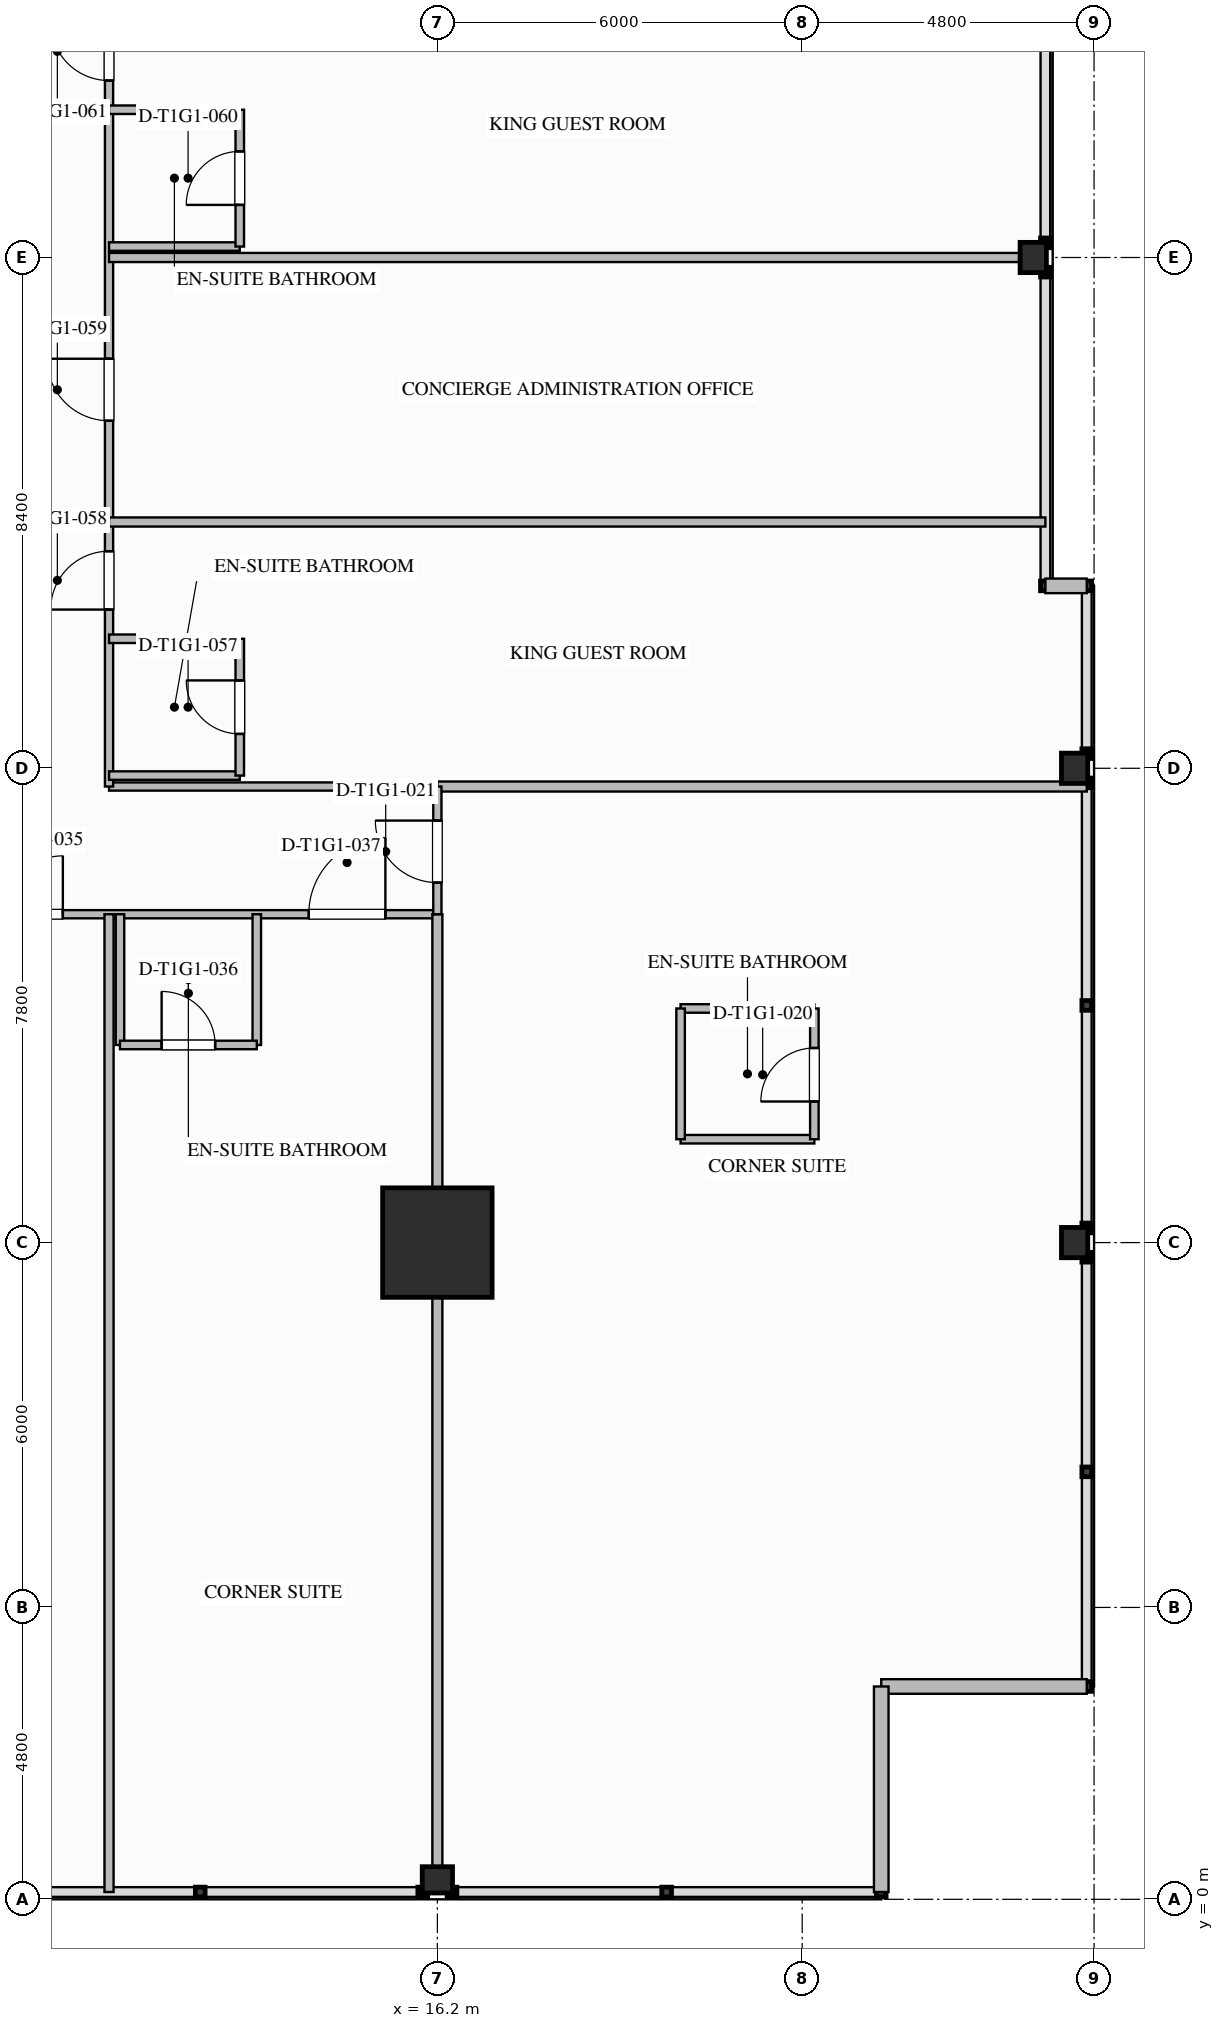
"""IFC4 building model, lengths in metres.
Left out: names, types, materials, properties, quantities, classifications, styles, units other than length and angle.
Written with IfcOpenShell. Run it as: python <this file> out.ifc"""

import sys

from ifc_helpers import new_model, si_unit, direction, frame, frame_2d, origin, origin_2d, place, context, subcontext, project, spatial, rectangle, i_section, extrude, element, fill, save


model = new_model("IFC4")
c1 = context("Model", 3, precision=1e-05, world=origin(), true_north=direction((0.0, 1.0)))
c2 = subcontext(c1, "Body", "Model", "MODEL_VIEW")
j1 = project(units=[si_unit("LENGTHUNIT", "METRE"), si_unit("PLANEANGLEUNIT", "RADIAN")], contexts=[c1])
p1 = place(None, origin())
s1 = spatial("IfcSite", under=j1, at=p1, CompositionType="ELEMENT")
p2 = place(p1, origin())
s2 = spatial("IfcBuilding", under=s1, at=p2, CompositionType="ELEMENT")
p3 = place(p2, frame((0.0, 0.0, 36.7)))
s3 = spatial("IfcBuildingStorey", under=s2, at=p3, CompositionType="ELEMENT", Elevation=36.7)
p4 = place(p3, frame((16.2, 10.8, 0.0), z_axis=(0.0, 0.0, 1.0), x_axis=(1.0, 0.0, 0.0)))
e1 = element("IfcColumn", 1, at=p4, inside=s3, PredefinedType="COLUMN", context=c2, shape_type="SweptSolid", body=[
    extrude(rectangle(XDim=1.8, YDim=1.8, at=origin_2d()), origin(), (0.0, 0.0, 1.0), 3.5),
])
for number, where, z_axis, x_axis in (
    (2, (26.68, 10.8, 0.0), (0.0, 0.0, 1.0), (1.0, 0.0, 0.0)),
    (3, (26.68, 18.6, 0.0), (0.0, 0.0, 1.0), (1.0, 0.0, 0.0)),
    (4, (26.0, 27.0, 0.0), (0.0, 0.0, 1.0), (1.0, 0.0, 0.0)),
    (5, (16.2, 0.32, 0.0), (0.0, 0.0, 1.0), (0.0, 1.0, 0.0)),
):
    element("IfcColumn", number, at=place(p3, frame(where, z_axis=z_axis, x_axis=x_axis)), inside=s3, PredefinedType="COLUMN", context=c2, shape_type="SweptSolid", body=[
        extrude(i_section(OverallWidth=0.432, OverallDepth=0.498, WebThickness=0.056, FlangeThickness=0.089, FilletRadius=0.03, at=origin_2d()), origin(), (0.0, 0.0, 1.0), 3.497),
    ])
for number, where, z_axis, x_axis in (
    (6, (26.88, 3.5, 0.0), (0.0, 0.0, 1.0), (-1.0, 0.0, 0.0)),
    (7, (23.5, 3.5, 0.0), (0.0, 0.0, 1.0), (0.0, -1.0, 0.0)),
):
    element("IfcWall", number, at=place(p3, frame(where, z_axis=z_axis, x_axis=x_axis)), inside=s3, PredefinedType="STANDARD", context=c2, shape_type="SweptSolid", body=[
        extrude(rectangle(XDim=3.38, YDim=0.24, at=frame_2d((1.69, 0.0))), origin(), (0.0, 0.0, 1.0), 3.24),
    ])
p5 = place(p3, frame((26.2, 21.6, 0.0), z_axis=(0.0, 0.0, 1.0), x_axis=(1.0, 0.0, 0.0)))
e8 = element("IfcWall", 8, at=p5, inside=s3, PredefinedType="STANDARD", context=c2, shape_type="SweptSolid", body=[
    extrude(rectangle(XDim=0.68, YDim=0.24, at=frame_2d((0.34, 0.0))), origin(), (0.0, 0.0, 1.0), 3.24),
])
p6 = place(p3, frame((-16.2, 16.2, 0.0), z_axis=(0.0, 0.0, 1.0), x_axis=(1.0, 0.0, 0.0)))
e9 = element("IfcWall", 9, at=p6, inside=s3, PredefinedType="PARTITIONING", context=c2, shape_type="SweptSolid", body=[
    extrude(rectangle(XDim=32.4, YDim=0.135, at=frame_2d((16.2, 0.0))), origin(), (0.0, 0.0, 1.0), 3.24),
])
p7 = place(p6, frame((3.285, 0.0, 0.0)))
e10 = element("IfcOpeningElement", 10, at=p7, cuts=e9, PredefinedType="OPENING", context=c2, shape_type="SweptSolid", body=[
    extrude(rectangle(XDim=1.26, YDim=2.2, at=frame_2d((0.63, 1.1))), frame((0.0, 0.077, 0.0), z_axis=(0.0, -1.0, 0.0), x_axis=(1.0, 0.0, 0.0)), (0.0, 0.0, 1.0), 0.155),
])
p8 = place(p6, frame((8.59, 0.0, 0.0)))
e11 = element("IfcOpeningElement", 11, at=p8, cuts=e9, PredefinedType="OPENING", context=c2, shape_type="SweptSolid", body=[
    extrude(rectangle(XDim=0.96, YDim=2.15, at=frame_2d((0.48, 1.075))), frame((0.0, 0.077, 0.0), z_axis=(0.0, -1.0, 0.0), x_axis=(1.0, 0.0, 0.0)), (0.0, 0.0, 1.0), 0.155),
])
p9 = place(p6, frame((13.84, 0.0, 0.0)))
e12 = element("IfcOpeningElement", 12, at=p9, cuts=e9, PredefinedType="OPENING", context=c2, shape_type="SweptSolid", body=[
    extrude(rectangle(XDim=1.26, YDim=2.2, at=frame_2d((0.63, 1.1))), frame((0.0, 0.077, 0.0), z_axis=(0.0, -1.0, 0.0), x_axis=(1.0, 0.0, 0.0)), (0.0, 0.0, 1.0), 0.155),
])
p10 = place(p6, frame((19.73, 0.0, 0.0)))
e13 = element("IfcOpeningElement", 13, at=p10, cuts=e9, PredefinedType="OPENING", context=c2, shape_type="SweptSolid", body=[
    extrude(rectangle(XDim=1.26, YDim=2.2, at=frame_2d((0.63, 1.1))), frame((0.0, 0.077, 0.0), z_axis=(0.0, -1.0, 0.0), x_axis=(1.0, 0.0, 0.0)), (0.0, 0.0, 1.0), 0.155),
])
p11 = place(p6, frame((25.281, 0.0, 0.0)))
e14 = element("IfcOpeningElement", 14, at=p11, cuts=e9, PredefinedType="OPENING", context=c2, shape_type="SweptSolid", body=[
    extrude(rectangle(XDim=0.96, YDim=2.15, at=frame_2d((0.48, 1.075))), frame((0.0, 0.077, 0.0), z_axis=(0.0, -1.0, 0.0), x_axis=(1.0, 0.0, 0.0)), (0.0, 0.0, 1.0), 0.155),
])
p12 = place(p6, frame((30.285, 0.0, 0.0)))
e15 = element("IfcOpeningElement", 15, at=p12, cuts=e9, PredefinedType="OPENING", context=c2, shape_type="SweptSolid", body=[
    extrude(rectangle(XDim=1.26, YDim=2.2, at=frame_2d((0.63, 1.1))), frame((0.0, 0.077, 0.0), z_axis=(0.0, -1.0, 0.0), x_axis=(1.0, 0.0, 0.0)), (0.0, 0.0, 1.0), 0.155),
])
p13 = place(p3, frame((10.8, 18.3, 0.0), z_axis=(0.0, 0.0, 1.0), x_axis=(1.0, 0.0, 0.0)))
e16 = element("IfcWall", 16, at=p13, inside=s3, PredefinedType="PARTITIONING", context=c2, shape_type="SweptSolid", body=[
    extrude(rectangle(XDim=5.4, YDim=0.135, at=frame_2d((2.7, 0.0))), origin(), (0.0, 0.0, 1.0), 3.24),
])
p14 = place(p3, frame((10.8, 18.3, 0.0), z_axis=(0.0, 0.0, 1.0), x_axis=(0.0, 1.0, 0.0)))
e17 = element("IfcWall", 17, at=p14, inside=s3, PredefinedType="PARTITIONING", context=c2, shape_type="SweptSolid", body=[
    extrude(rectangle(XDim=17.4, YDim=0.135, at=frame_2d((8.7, 0.0))), origin(), (0.0, 0.0, 1.0), 3.24),
])
p15 = place(p14, frame((2.91, 0.0, 0.0)))
e18 = element("IfcOpeningElement", 18, at=p15, cuts=e17, PredefinedType="OPENING", context=c2, shape_type="SweptSolid", body=[
    extrude(rectangle(XDim=0.96, YDim=2.15, at=frame_2d((0.48, 1.075))), frame((0.0, 0.077, 0.0), z_axis=(0.0, -1.0, 0.0), x_axis=(1.0, 0.0, 0.0)), (0.0, 0.0, 1.0), 0.155),
])
p16 = place(p14, frame((6.015, 0.0, 0.0)))
e19 = element("IfcOpeningElement", 19, at=p16, cuts=e17, PredefinedType="OPENING", context=c2, shape_type="SweptSolid", body=[
    extrude(rectangle(XDim=1.02, YDim=2.15, at=frame_2d((0.51, 1.075))), frame((0.0, 0.077, 0.0), z_axis=(0.0, -1.0, 0.0), x_axis=(1.0, 0.0, 0.0)), (0.0, 0.0, 1.0), 0.155),
])
p17 = place(p14, frame((11.61, 0.0, 0.0)))
e20 = element("IfcOpeningElement", 20, at=p17, cuts=e17, PredefinedType="OPENING", context=c2, shape_type="SweptSolid", body=[
    extrude(rectangle(XDim=0.96, YDim=2.15, at=frame_2d((0.48, 1.075))), frame((0.0, 0.077, 0.0), z_axis=(0.0, -1.0, 0.0), x_axis=(1.0, 0.0, 0.0)), (0.0, 0.0, 1.0), 0.155),
])
p18 = place(p14, frame((15.96, 0.0, 0.0)))
e21 = element("IfcOpeningElement", 21, at=p18, cuts=e17, PredefinedType="OPENING", context=c2, shape_type="SweptSolid", body=[
    extrude(rectangle(XDim=0.96, YDim=2.15, at=frame_2d((0.48, 1.075))), frame((0.0, 0.077, 0.0), z_axis=(0.0, -1.0, 0.0), x_axis=(1.0, 0.0, 0.0)), (0.0, 0.0, 1.0), 0.155),
])
p19 = place(p3, frame((16.2, 0.12, 0.0), z_axis=(0.0, 0.0, 1.0), x_axis=(0.0, 1.0, 0.0)))
e22 = element("IfcWall", 22, at=p19, inside=s3, PredefinedType="PARTITIONING", context=c2, shape_type="SweptSolid", body=[
    extrude(rectangle(XDim=16.08, YDim=0.165, at=frame_2d((8.04, 0.0))), origin(), (0.0, 0.0, 1.0), 2.298),
])
p20 = place(p3, frame((16.2, 18.3, 0.0), z_axis=(0.0, 0.0, 1.0), x_axis=(1.0, 0.0, 0.0)))
e23 = element("IfcWall", 23, at=p20, inside=s3, PredefinedType="PARTITIONING", context=c2, shape_type="SweptSolid", body=[
    extrude(rectangle(XDim=10.68, YDim=0.165, at=frame_2d((5.34, 0.0))), origin(), (0.0, 0.0, 1.0), 2.298),
])
p21 = place(p3, frame((16.2, 16.2, 0.0), z_axis=(0.0, 0.0, 1.0), x_axis=(0.0, 1.0, 0.0)))
e24 = element("IfcWall", 24, at=p21, inside=s3, PredefinedType="PARTITIONING", context=c2, shape_type="SweptSolid", body=[
    extrude(rectangle(XDim=2.1, YDim=0.135, at=frame_2d((1.05, 0.0))), origin(), (0.0, 0.0, 1.0), 2.298),
])
p22 = place(p21, frame((0.52, 0.0, 0.0)))
e25 = element("IfcOpeningElement", 25, at=p22, cuts=e24, PredefinedType="OPENING", context=c2, shape_type="SweptSolid", body=[
    extrude(rectangle(XDim=1.02, YDim=2.15, at=frame_2d((0.51, 1.075))), frame((0.0, 0.077, 0.0), z_axis=(0.0, -1.0, 0.0), x_axis=(1.0, 0.0, 0.0)), (0.0, 0.0, 1.0), 0.155),
])
for number, where, z_axis, x_axis in (
    (26, (20.2, 12.5, 0.0), (0.0, 0.0, 1.0), (1.0, 0.0, 0.0)),
    (27, (20.2, 14.65, 0.0), (0.0, 0.0, 1.0), (1.0, 0.0, 0.0)),
):
    element("IfcWall", number, at=place(p3, frame(where, z_axis=z_axis, x_axis=x_axis)), inside=s3, PredefinedType="PLUMBINGWALL", context=c2, shape_type="SweptSolid", body=[
        extrude(rectangle(XDim=2.2, YDim=0.14, at=frame_2d((1.1, 0.0))), origin(), (0.0, 0.0, 1.0), 3.24),
    ])
p23 = place(p3, frame((20.2, 12.5, 0.0), z_axis=(0.0, 0.0, 1.0), x_axis=(0.0, 1.0, 0.0)))
e28 = element("IfcWall", 28, at=p23, inside=s3, PredefinedType="PLUMBINGWALL", context=c2, shape_type="SweptSolid", body=[
    extrude(rectangle(XDim=2.15, YDim=0.14, at=frame_2d((1.075, 0.0))), origin(), (0.0, 0.0, 1.0), 3.24),
])
p24 = place(p3, frame((22.4, 12.5, 0.0), z_axis=(0.0, 0.0, 1.0), x_axis=(0.0, 1.0, 0.0)))
e29 = element("IfcWall", 29, at=p24, inside=s3, PredefinedType="PLUMBINGWALL", context=c2, shape_type="SweptSolid", body=[
    extrude(rectangle(XDim=2.15, YDim=0.14, at=frame_2d((1.075, 0.0))), origin(), (0.0, 0.0, 1.0), 3.24),
])
p25 = place(p24, frame((0.62, 0.0, 0.0)))
e30 = element("IfcOpeningElement", 30, at=p25, cuts=e29, PredefinedType="OPENING", context=c2, shape_type="SweptSolid", body=[
    extrude(rectangle(XDim=0.88, YDim=2.1, at=frame_2d((0.44, 1.05))), frame((0.0, 0.08, 0.0), z_axis=(0.0, -1.0, 0.0), x_axis=(1.0, 0.0, 0.0)), (0.0, 0.0, 1.0), 0.16),
])
p26 = place(p3, frame((10.8, 0.12, 0.0), z_axis=(0.0, 0.0, 1.0), x_axis=(0.0, 1.0, 0.0)))
e31 = element("IfcWall", 31, at=p26, inside=s3, PredefinedType="PARTITIONING", context=c2, shape_type="SweptSolid", body=[
    extrude(rectangle(XDim=16.08, YDim=0.15, at=frame_2d((8.04, 0.0))), origin(), (0.0, 0.0, 1.0), 3.24),
])
for number, where, z_axis, x_axis in (
    (32, (10.98, 16.2, 0.0), (0.0, 0.0, 1.0), (0.0, -1.0, 0.0)),
    (33, (13.23, 16.2, 0.0), (0.0, 0.0, 1.0), (0.0, -1.0, 0.0)),
):
    element("IfcWall", number, at=place(p3, frame(where, z_axis=z_axis, x_axis=x_axis)), inside=s3, PredefinedType="PLUMBINGWALL", context=c2, shape_type="SweptSolid", body=[
        extrude(rectangle(XDim=2.15, YDim=0.14, at=frame_2d((1.075, 0.0))), origin(), (0.0, 0.0, 1.0), 3.24),
    ])
p27 = place(p3, frame((10.98, 14.05, 0.0), z_axis=(0.0, 0.0, 1.0), x_axis=(1.0, 0.0, 0.0)))
e34 = element("IfcWall", 34, at=p27, inside=s3, PredefinedType="PLUMBINGWALL", context=c2, shape_type="SweptSolid", body=[
    extrude(rectangle(XDim=2.25, YDim=0.14, at=frame_2d((1.125, 0.0))), origin(), (0.0, 0.0, 1.0), 3.24),
])
p28 = place(p27, frame((0.685, 0.0, 0.0)))
e35 = element("IfcOpeningElement", 35, at=p28, cuts=e34, PredefinedType="OPENING", context=c2, shape_type="SweptSolid", body=[
    extrude(rectangle(XDim=0.88, YDim=2.1, at=frame_2d((0.44, 1.05))), frame((0.0, 0.08, 0.0), z_axis=(0.0, -1.0, 0.0), x_axis=(1.0, 0.0, 0.0)), (0.0, 0.0, 1.0), 0.16),
])
p29 = place(p3, frame((10.8, 18.48, 0.0), z_axis=(0.0, 0.0, 1.0), x_axis=(1.0, 0.0, 0.0)))
e36 = element("IfcWall", 36, at=p29, inside=s3, PredefinedType="PLUMBINGWALL", context=c2, shape_type="SweptSolid", body=[
    extrude(rectangle(XDim=2.15, YDim=0.14, at=frame_2d((1.075, 0.0))), origin(), (0.0, 0.0, 1.0), 2.617),
])
p30 = place(p3, frame((10.8, 20.73, 0.0), z_axis=(0.0, 0.0, 1.0), x_axis=(1.0, 0.0, 0.0)))
e37 = element("IfcWall", 37, at=p30, inside=s3, PredefinedType="PLUMBINGWALL", context=c2, shape_type="SweptSolid", body=[
    extrude(rectangle(XDim=2.15, YDim=0.14, at=frame_2d((1.075, 0.0))), origin(), (0.0, 0.0, 1.0), 3.24),
])
p31 = place(p3, frame((12.95, 18.48, 0.0), z_axis=(0.0, 0.0, 1.0), x_axis=(0.0, 1.0, 0.0)))
e38 = element("IfcWall", 38, at=p31, inside=s3, PredefinedType="PLUMBINGWALL", context=c2, shape_type="SweptSolid", body=[
    extrude(rectangle(XDim=2.25, YDim=0.14, at=frame_2d((1.125, 0.0))), origin(), (0.0, 0.0, 1.0), 3.24),
])
p32 = place(p31, frame((0.685, 0.0, 0.0)))
e39 = element("IfcOpeningElement", 39, at=p32, cuts=e38, PredefinedType="OPENING", context=c2, shape_type="SweptSolid", body=[
    extrude(rectangle(XDim=0.88, YDim=2.1, at=frame_2d((0.44, 1.05))), frame((0.0, 0.08, 0.0), z_axis=(0.0, -1.0, 0.0), x_axis=(1.0, 0.0, 0.0)), (0.0, 0.0, 1.0), 0.16),
])
p33 = place(p3, frame((10.8, 22.65, 0.0), z_axis=(0.0, 0.0, 1.0), x_axis=(1.0, 0.0, 0.0)))
e40 = element("IfcWall", 40, at=p33, inside=s3, PredefinedType="PARTITIONING", context=c2, shape_type="SweptSolid", body=[
    extrude(rectangle(XDim=15.4, YDim=0.15, at=frame_2d((7.7, 0.0))), origin(), (0.0, 0.0, 1.0), 3.24),
])
p34 = place(p3, frame((10.8, 27.0, 0.0), z_axis=(0.0, 0.0, 1.0), x_axis=(1.0, 0.0, 0.0)))
e41 = element("IfcWall", 41, at=p34, inside=s3, PredefinedType="PARTITIONING", context=c2, shape_type="SweptSolid", body=[
    extrude(rectangle(XDim=15.4, YDim=0.15, at=frame_2d((7.7, 0.0))), origin(), (0.0, 0.0, 1.0), 2.298),
])
p35 = place(p3, frame((10.8, 27.18, 0.0), z_axis=(0.0, 0.0, 1.0), x_axis=(1.0, 0.0, 0.0)))
e42 = element("IfcWall", 42, at=p35, inside=s3, PredefinedType="PLUMBINGWALL", context=c2, shape_type="SweptSolid", body=[
    extrude(rectangle(XDim=2.15, YDim=0.14, at=frame_2d((1.075, 0.0))), origin(), (0.0, 0.0, 1.0), 2.617),
])
p36 = place(p3, frame((10.8, 29.43, 0.0), z_axis=(0.0, 0.0, 1.0), x_axis=(1.0, 0.0, 0.0)))
e43 = element("IfcWall", 43, at=p36, inside=s3, PredefinedType="PLUMBINGWALL", context=c2, shape_type="SweptSolid", body=[
    extrude(rectangle(XDim=2.15, YDim=0.14, at=frame_2d((1.075, 0.0))), origin(), (0.0, 0.0, 1.0), 3.24),
])
p37 = place(p3, frame((12.95, 27.18, 0.0), z_axis=(0.0, 0.0, 1.0), x_axis=(0.0, 1.0, 0.0)))
e44 = element("IfcWall", 44, at=p37, inside=s3, PredefinedType="PLUMBINGWALL", context=c2, shape_type="SweptSolid", body=[
    extrude(rectangle(XDim=2.25, YDim=0.14, at=frame_2d((1.125, 0.0))), origin(), (0.0, 0.0, 1.0), 3.24),
])
p38 = place(p37, frame((0.685, 0.0, 0.0)))
e45 = element("IfcOpeningElement", 45, at=p38, cuts=e44, PredefinedType="OPENING", context=c2, shape_type="SweptSolid", body=[
    extrude(rectangle(XDim=0.88, YDim=2.1, at=frame_2d((0.44, 1.05))), frame((0.0, 0.08, 0.0), z_axis=(0.0, -1.0, 0.0), x_axis=(1.0, 0.0, 0.0)), (0.0, 0.0, 1.0), 0.16),
])
p39 = place(p25, origin())
e46 = element("IfcDoor", 46, at=p39, inside=s3, OperationType="SINGLE_SWING_LEFT", PredefinedType="DOOR", context=c2, shape_type="SweptSolid", body=[
    extrude(rectangle(XDim=0.88, YDim=2.1, at=frame_2d((0.44, 1.05))), frame((0.0, 0.025, 0.0), z_axis=(0.0, -1.0, 0.0), x_axis=(1.0, 0.0, 0.0)), (0.0, 0.0, 1.0), 0.05),
])
fill(e30, e46)
p40 = place(p22, origin())
e47 = element("IfcDoor", 47, at=p40, inside=s3, OperationType="SINGLE_SWING_RIGHT", PredefinedType="DOOR", context=c2, shape_type="SweptSolid", body=[
    extrude(rectangle(XDim=1.02, YDim=2.15, at=frame_2d((0.51, 1.075))), frame((0.0, 0.025, 0.0), z_axis=(0.0, -1.0, 0.0), x_axis=(1.0, 0.0, 0.0)), (0.0, 0.0, 1.0), 0.05),
])
fill(e25, e47)
p41 = place(p11, origin())
e48 = element("IfcDoor", 48, at=p41, inside=s3, OperationType="SINGLE_SWING_RIGHT", PredefinedType="DOOR", context=c2, shape_type="SweptSolid", body=[
    extrude(rectangle(XDim=0.96, YDim=2.15, at=frame_2d((0.48, 1.075))), frame((0.0, 0.025, 0.0), z_axis=(0.0, -1.0, 0.0), x_axis=(1.0, 0.0, 0.0)), (0.0, 0.0, 1.0), 0.05),
])
fill(e14, e48)
p42 = place(p28, origin())
e49 = element("IfcDoor", 49, at=p42, inside=s3, OperationType="SINGLE_SWING_LEFT", PredefinedType="DOOR", context=c2, shape_type="SweptSolid", body=[
    extrude(rectangle(XDim=0.88, YDim=2.1, at=frame_2d((0.44, 1.05))), frame((0.0, 0.025, 0.0), z_axis=(0.0, -1.0, 0.0), x_axis=(1.0, 0.0, 0.0)), (0.0, 0.0, 1.0), 0.05),
])
fill(e35, e49)
p43 = place(p12, origin())
e50 = element("IfcDoor", 50, at=p43, inside=s3, OperationType="SINGLE_SWING_RIGHT", PredefinedType="DOOR", context=c2, shape_type="SweptSolid", body=[
    extrude(rectangle(XDim=1.26, YDim=2.2, at=frame_2d((0.63, 1.1))), frame((0.0, 0.025, 0.0), z_axis=(0.0, -1.0, 0.0), x_axis=(1.0, 0.0, 0.0)), (0.0, 0.0, 1.0), 0.05),
])
fill(e15, e50)
p44 = place(p32, origin())
e51 = element("IfcDoor", 51, at=p44, inside=s3, OperationType="SINGLE_SWING_RIGHT", PredefinedType="DOOR", context=c2, shape_type="SweptSolid", body=[
    extrude(rectangle(XDim=0.88, YDim=2.1, at=frame_2d((0.44, 1.05))), frame((0.0, 0.025, 0.0), z_axis=(0.0, -1.0, 0.0), x_axis=(1.0, 0.0, 0.0)), (0.0, 0.0, 1.0), 0.05),
])
fill(e39, e51)
p45 = place(p15, origin())
e52 = element("IfcDoor", 52, at=p45, inside=s3, OperationType="SINGLE_SWING_LEFT", PredefinedType="DOOR", context=c2, shape_type="SweptSolid", body=[
    extrude(rectangle(XDim=0.96, YDim=2.15, at=frame_2d((0.48, 1.075))), frame((0.0, 0.025, 0.0), z_axis=(0.0, -1.0, 0.0), x_axis=(1.0, 0.0, 0.0)), (0.0, 0.0, 1.0), 0.05),
])
fill(e18, e52)
p46 = place(p16, origin())
e53 = element("IfcDoor", 53, at=p46, inside=s3, OperationType="SINGLE_SWING_RIGHT", PredefinedType="DOOR", context=c2, shape_type="SweptSolid", body=[
    extrude(rectangle(XDim=1.02, YDim=2.15, at=frame_2d((0.51, 1.075))), frame((0.0, 0.025, 0.0), z_axis=(0.0, -1.0, 0.0), x_axis=(1.0, 0.0, 0.0)), (0.0, 0.0, 1.0), 0.05),
])
fill(e19, e53)
p47 = place(p38, origin())
e54 = element("IfcDoor", 54, at=p47, inside=s3, OperationType="SINGLE_SWING_LEFT", PredefinedType="DOOR", context=c2, shape_type="SweptSolid", body=[
    extrude(rectangle(XDim=0.88, YDim=2.1, at=frame_2d((0.44, 1.05))), frame((0.0, 0.025, 0.0), z_axis=(0.0, -1.0, 0.0), x_axis=(1.0, 0.0, 0.0)), (0.0, 0.0, 1.0), 0.05),
])
fill(e45, e54)
p48 = place(p17, origin())
e55 = element("IfcDoor", 55, at=p48, inside=s3, OperationType="SINGLE_SWING_RIGHT", PredefinedType="DOOR", context=c2, shape_type="SweptSolid", body=[
    extrude(rectangle(XDim=0.96, YDim=2.15, at=frame_2d((0.48, 1.075))), frame((0.0, 0.025, 0.0), z_axis=(0.0, -1.0, 0.0), x_axis=(1.0, 0.0, 0.0)), (0.0, 0.0, 1.0), 0.05),
])
fill(e20, e55)
save(model, sys.argv[1])
